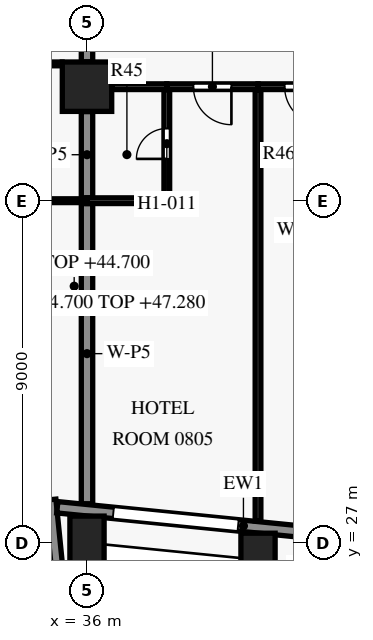
"""IFC4 building model, lengths in metres.
Left out: names, types, materials, properties, quantities, classifications, styles, units other than length and angle.
Written with IfcOpenShell. Run it as: python <this file> out.ifc"""

import sys

from ifc_helpers import new_model, si_unit, direction, frame, frame_2d, origin, origin_2d, place, context, subcontext, project, spatial, rectangle, extrude, element, fill, save


model = new_model("IFC4")
c1 = context("Model", 3, precision=1e-05, world=origin(), true_north=direction((0.0, 1.0)))
c2 = subcontext(c1, "Body", "Model", "MODEL_VIEW")
j1 = project(units=[si_unit("LENGTHUNIT", "METRE"), si_unit("PLANEANGLEUNIT", "RADIAN")], contexts=[c1])
p1 = place(None, origin())
s1 = spatial("IfcSite", under=j1, at=p1, CompositionType="ELEMENT")
p2 = place(p1, origin())
s2 = spatial("IfcBuilding", under=s1, at=p2, CompositionType="ELEMENT")
p3 = place(p2, frame((0.0, 0.0, 44.7)))
s3 = spatial("IfcBuildingStorey", under=s2, at=p3, CompositionType="ELEMENT", Elevation=44.7)
for number, where, z_axis, x_axis in (
    (1, (36.0, 27.0, 0.0), (0.0, 0.0, 1.0), (-0.1, 0.995, 0.0)),
    (2, (40.5, 26.55, 0.0), (0.0, 0.0, 1.0), (0.995, -0.1, 0.0)),
):
    element("IfcColumn", number, at=place(p3, frame(where, z_axis=z_axis, x_axis=x_axis)), inside=s3, PredefinedType="COLUMN", context=c2, shape_type="SweptSolid", body=[
        extrude(rectangle(XDim=0.9, YDim=1.4, at=origin_2d()), origin(), (0.0, 0.0, 1.0), 3.6),
    ])
p4 = place(p3, frame((36.0, 39.0, 0.0), z_axis=(0.0, 0.0, 1.0), x_axis=(1.0, 0.0, 0.0)))
e3 = element("IfcColumn", 3, at=p4, inside=s3, PredefinedType="COLUMN", context=c2, shape_type="SweptSolid", body=[
    extrude(rectangle(XDim=1.3, YDim=1.3, at=origin_2d()), origin(), (0.0, 0.0, 1.0), 3.6),
])
p5 = place(p3, frame((35.033, 28.132, 0.0), z_axis=(0.0, 0.0, 1.0), x_axis=(0.099487051997, -0.995038856771, 0.0)))
e4 = element("IfcWall", 4, at=p5, inside=s3, PredefinedType="SOLIDWALL", context=c2, shape_type="SweptSolid", body=[
    extrude(rectangle(XDim=10.152, YDim=0.3, at=frame_2d((5.076, 0.0))), origin(), (0.0, 0.0, 1.0), 2.95),
])
p6 = place(p5, frame((1.833, 0.0, 0.15)))
e5 = element("IfcOpeningElement", 5, at=p6, cuts=e4, PredefinedType="OPENING", context=c2, shape_type="SweptSolid", body=[
    extrude(rectangle(XDim=3.3, YDim=2.4, at=frame_2d((1.65, 1.2))), frame((0.0, 0.16, 0.0), z_axis=(0.0, -1.0, 0.0), x_axis=(1.0, 0.0, 0.0)), (0.0, 0.0, 1.0), 0.32),
])
p7 = place(p5, frame((7.106, 0.0, 0.75)))
e6 = element("IfcOpeningElement", 6, at=p7, cuts=e4, PredefinedType="OPENING", context=c2, shape_type="SweptSolid", body=[
    extrude(rectangle(XDim=1.8, YDim=1.8, at=frame_2d((0.9, 0.9))), frame((0.0, 0.16, 0.0), z_axis=(0.0, -1.0, 0.0), x_axis=(1.0, 0.0, 0.0)), (0.0, 0.0, 1.0), 0.32),
])
p8 = place(p3, frame((45.015, 26.953, 0.0), z_axis=(0.0, 0.0, 1.0), x_axis=(-0.995036699177, 0.099508629231, 0.0)))
e7 = element("IfcWall", 7, at=p8, inside=s3, PredefinedType="SOLIDWALL", context=c2, shape_type="SweptSolid", body=[
    extrude(rectangle(XDim=9.846, YDim=0.3, at=frame_2d((4.923, 0.0))), origin(), (0.0, 0.0, 1.0), 2.95),
])
p9 = place(p8, frame((1.291, 0.0, 0.75)))
e8 = element("IfcOpeningElement", 8, at=p9, cuts=e7, PredefinedType="OPENING", context=c2, shape_type="SweptSolid", body=[
    extrude(rectangle(XDim=1.8, YDim=1.8, at=frame_2d((0.9, 0.9))), frame((0.0, 0.16, 0.0), z_axis=(0.0, -1.0, 0.0), x_axis=(1.0, 0.0, 0.0)), (0.0, 0.0, 1.0), 0.32),
])
p10 = place(p8, frame((5.064, 0.0, 0.15)))
e9 = element("IfcOpeningElement", 9, at=p10, cuts=e7, PredefinedType="OPENING", context=c2, shape_type="SweptSolid", body=[
    extrude(rectangle(XDim=3.3, YDim=2.4, at=frame_2d((1.65, 1.2))), frame((0.0, 0.16, 0.0), z_axis=(0.0, -1.0, 0.0), x_axis=(1.0, 0.0, 0.0)), (0.0, 0.0, 1.0), 0.32),
])
p11 = place(p3, frame((36.0, 35.925, 0.0), z_axis=(0.0, 0.0, 1.0), x_axis=(0.0, -1.0, 0.0)))
e10 = element("IfcWall", 10, at=p11, inside=s3, PredefinedType="PARTITIONING", context=c2, shape_type="SweptSolid", body=[
    extrude(rectangle(XDim=7.9, YDim=0.3, at=frame_2d((3.95, 0.0))), origin(), (0.0, 0.0, 1.0), 2.58),
])
p12 = place(p3, frame((36.0, 36.0, 0.0), z_axis=(0.0, 0.0, 1.0), x_axis=(-1.0, 0.0, 0.0)))
e11 = element("IfcWall", 11, at=p12, inside=s3, PredefinedType="PARTITIONING", context=c2, shape_type="SweptSolid", body=[
    extrude(rectangle(XDim=6.55, YDim=0.1, at=frame_2d((3.275, 0.0))), origin(), (0.0, 0.0, 1.0), 2.58),
])
p13 = place(p3, frame((36.0, 36.0, 0.0), z_axis=(0.0, 0.0, 1.0), x_axis=(1.0, 0.0, 0.0)))
e12 = element("IfcWall", 12, at=p13, inside=s3, PredefinedType="PARTITIONING", context=c2, shape_type="SweptSolid", body=[
    extrude(rectangle(XDim=2.175, YDim=0.15, at=frame_2d((1.087, 0.0))), origin(), (0.0, 0.0, 1.0), 2.58),
])
p14 = place(p3, frame((38.1, 36.075, 0.0), z_axis=(0.0, 0.0, 1.0), x_axis=(0.0, 1.0, 0.0)))
e13 = element("IfcWall", 13, at=p14, inside=s3, PredefinedType="PARTITIONING", context=c2, shape_type="SweptSolid", body=[
    extrude(rectangle(XDim=2.85, YDim=0.15, at=frame_2d((1.425, 0.0))), origin(), (0.0, 0.0, 1.0), 2.58),
])
p15 = place(p14, frame((1.025, 0.0, 0.0)))
e14 = element("IfcOpeningElement", 14, at=p15, cuts=e13, PredefinedType="OPENING", context=c2, shape_type="SweptSolid", body=[
    extrude(rectangle(XDim=0.8, YDim=2.1, at=frame_2d((0.4, 1.05))), frame((0.0, 0.085, 0.0), z_axis=(0.0, -1.0, 0.0), x_axis=(1.0, 0.0, 0.0)), (0.0, 0.0, 1.0), 0.17),
])
p16 = place(p3, frame((36.0, 38.345, 0.0), z_axis=(0.0, 0.0, 1.0), x_axis=(0.0, -1.0, 0.0)))
e15 = element("IfcWall", 15, at=p16, inside=s3, PredefinedType="PARTITIONING", context=c2, shape_type="SweptSolid", body=[
    extrude(rectangle(XDim=2.27, YDim=0.3, at=frame_2d((1.135, 0.0))), origin(), (0.0, 0.0, 1.0), 2.58),
])
p17 = place(p3, frame((40.5, 38.925, 0.0), z_axis=(0.0, 0.0, 1.0), x_axis=(0.0, -1.0, 0.0)))
e16 = element("IfcWall", 16, at=p17, inside=s3, PredefinedType="PARTITIONING", context=c2, shape_type="SweptSolid", body=[
    extrude(rectangle(XDim=11.35, YDim=0.15, at=frame_2d((5.675, 0.0))), origin(), (0.0, 0.0, 1.0), 2.58),
])
p18 = place(p3, frame((38.1, 39.0, 0.0), z_axis=(0.0, 0.0, 1.0), x_axis=(-1.0, 0.0, 0.0)))
e17 = element("IfcWall", 17, at=p18, inside=s3, PredefinedType="PARTITIONING", context=c2, shape_type="SweptSolid", body=[
    extrude(rectangle(XDim=1.445, YDim=0.15, at=frame_2d((0.723, 0.0))), origin(), (0.0, 0.0, 1.0), 2.58),
])
p19 = place(p3, frame((40.5, 39.0, 0.0), z_axis=(0.0, 0.0, 1.0), x_axis=(-1.0, 0.0, 0.0)))
e18 = element("IfcWall", 18, at=p19, inside=s3, PredefinedType="PARTITIONING", context=c2, shape_type="SweptSolid", body=[
    extrude(rectangle(XDim=2.4, YDim=0.15, at=frame_2d((1.2, 0.0))), origin(), (0.0, 0.0, 1.0), 2.58),
])
p20 = place(p19, frame((0.7, 0.0, 0.0)))
e19 = element("IfcOpeningElement", 19, at=p20, cuts=e18, PredefinedType="OPENING", context=c2, shape_type="SweptSolid", body=[
    extrude(rectangle(XDim=1.0, YDim=2.1, at=frame_2d((0.5, 1.05))), frame((0.0, 0.085, 0.0), z_axis=(0.0, -1.0, 0.0), x_axis=(1.0, 0.0, 0.0)), (0.0, 0.0, 1.0), 0.17),
])
p21 = place(p3, frame((42.9, 39.0, 0.0), z_axis=(0.0, 0.0, 1.0), x_axis=(-1.0, 0.0, 0.0)))
e20 = element("IfcWall", 20, at=p21, inside=s3, PredefinedType="PARTITIONING", context=c2, shape_type="SweptSolid", body=[
    extrude(rectangle(XDim=2.4, YDim=0.15, at=frame_2d((1.2, 0.0))), origin(), (0.0, 0.0, 1.0), 2.58),
])
p22 = place(p21, frame((0.7, 0.0, 0.0)))
e21 = element("IfcOpeningElement", 21, at=p22, cuts=e20, PredefinedType="OPENING", context=c2, shape_type="SweptSolid", body=[
    extrude(rectangle(XDim=1.0, YDim=2.1, at=frame_2d((0.5, 1.05))), frame((0.0, 0.085, 0.0), z_axis=(0.0, -1.0, 0.0), x_axis=(1.0, 0.0, 0.0)), (0.0, 0.0, 1.0), 0.17),
])
p23 = place(p3, frame((35.345, 39.6, 0.0), z_axis=(0.0, 0.0, 1.0), x_axis=(-1.0, 0.0, 0.0)))
e22 = element("IfcWall", 22, at=p23, inside=s3, PredefinedType="PARTITIONING", context=c2, shape_type="SweptSolid", body=[
    extrude(rectangle(XDim=5.895, YDim=0.1, at=frame_2d((2.948, 0.0))), origin(), (0.0, 0.0, 1.0), 3.28),
])
p24 = place(p3, frame((36.0, 43.15, 0.0), z_axis=(0.0, 0.0, 1.0), x_axis=(0.0, -1.0, 0.0)))
e23 = element("IfcWall", 23, at=p24, inside=s3, PredefinedType="PARTITIONING", context=c2, shape_type="SweptSolid", body=[
    extrude(rectangle(XDim=3.495, YDim=0.3, at=frame_2d((1.748, 0.0))), origin(), (0.0, 0.0, 1.0), 2.58),
])
p25 = place(p10, origin())
e24 = element("IfcWindow", 24, at=p25, inside=s3, PartitioningType="SINGLE_PANEL", PredefinedType="WINDOW", context=c2, shape_type="SweptSolid", body=[
    extrude(rectangle(XDim=3.3, YDim=2.4, at=frame_2d((1.65, 1.2))), frame((0.0, 0.03, 0.0), z_axis=(0.0, -1.0, 0.0), x_axis=(1.0, 0.0, 0.0)), (0.0, 0.0, 1.0), 0.06),
])
fill(e9, e24)
p26 = place(p20, origin())
e25 = element("IfcDoor", 25, at=p26, inside=s3, OperationType="SINGLE_SWING_LEFT", PredefinedType="DOOR", context=c2, shape_type="SweptSolid", body=[
    extrude(rectangle(XDim=1.0, YDim=2.1, at=frame_2d((0.5, 1.05))), frame((0.0, 0.025, 0.0), z_axis=(0.0, -1.0, 0.0), x_axis=(1.0, 0.0, 0.0)), (0.0, 0.0, 1.0), 0.05),
])
fill(e19, e25)
p27 = place(p15, origin())
e26 = element("IfcDoor", 26, at=p27, inside=s3, OperationType="SINGLE_SWING_LEFT", PredefinedType="DOOR", context=c2, shape_type="SweptSolid", body=[
    extrude(rectangle(XDim=0.8, YDim=2.1, at=frame_2d((0.4, 1.05))), frame((0.0, 0.025, 0.0), z_axis=(0.0, -1.0, 0.0), x_axis=(1.0, 0.0, 0.0)), (0.0, 0.0, 1.0), 0.05),
])
fill(e14, e26)
p28 = place(p22, origin())
e27 = element("IfcDoor", 27, at=p28, inside=s3, OperationType="SINGLE_SWING_LEFT", PredefinedType="DOOR", context=c2, shape_type="SweptSolid", body=[
    extrude(rectangle(XDim=1.0, YDim=2.1, at=frame_2d((0.5, 1.05))), frame((0.0, 0.025, 0.0), z_axis=(0.0, -1.0, 0.0), x_axis=(1.0, 0.0, 0.0)), (0.0, 0.0, 1.0), 0.05),
])
fill(e21, e27)
save(model, sys.argv[1])
